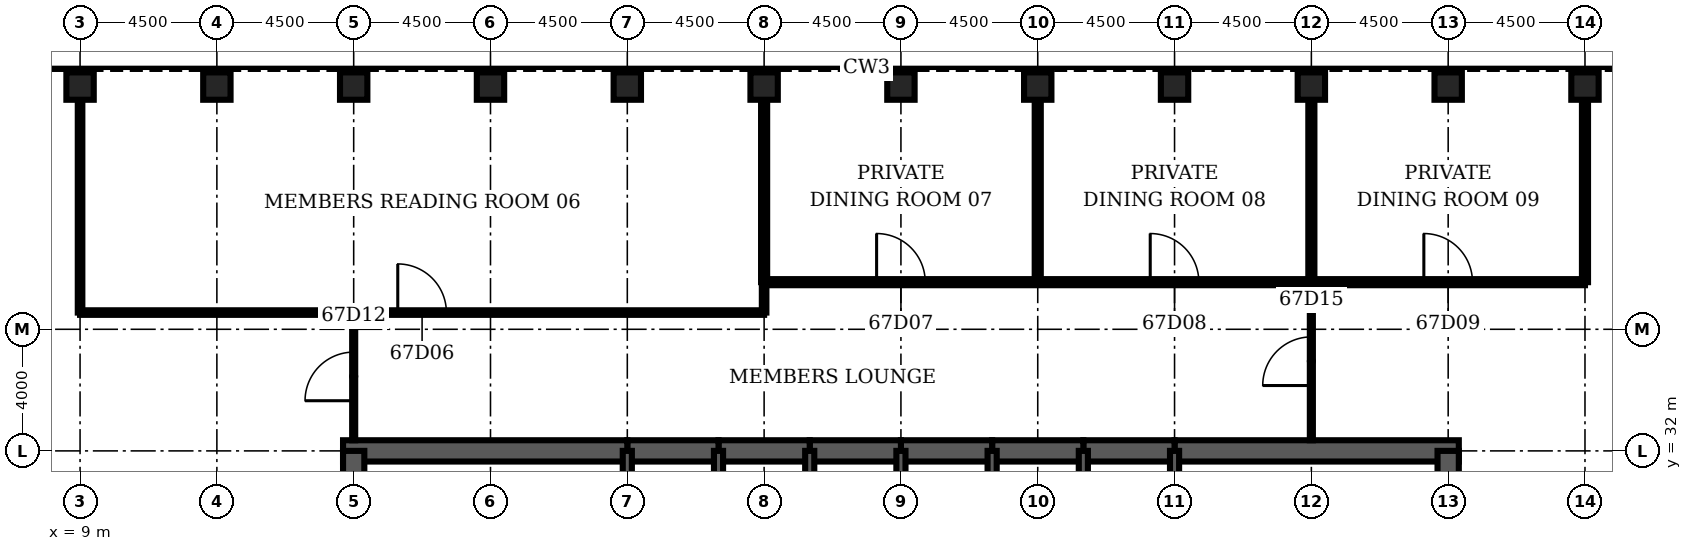
"""IFC4 building model, lengths in metres.
Left out: names, types, materials, properties, quantities, classifications, styles, units other than length and angle.
Written with IfcOpenShell. Run it as: python <this file> out.ifc"""

import sys

from ifc_helpers import new_model, si_unit, direction, frame, frame_2d, origin, origin_2d, place, context, subcontext, project, spatial, rectangle, hollow_rectangle, extrude, element, fill, save


model = new_model("IFC4")
c1 = context("Model", 3, precision=1e-05, world=origin(), true_north=direction((0.0, 1.0)))
c2 = subcontext(c1, "Body", "Model", "MODEL_VIEW")
j1 = project(units=[si_unit("LENGTHUNIT", "METRE"), si_unit("PLANEANGLEUNIT", "RADIAN")], contexts=[c1])
p1 = place(None, origin())
s1 = spatial("IfcSite", under=j1, at=p1, CompositionType="ELEMENT")
p2 = place(p1, origin())
s2 = spatial("IfcBuilding", under=s1, at=p2, CompositionType="ELEMENT")
p3 = place(p2, frame((0.0, 0.0, 296.3)))
s3 = spatial("IfcBuildingStorey", under=s2, at=p3, CompositionType="ELEMENT", Elevation=296.3)
for number, where, z_axis, x_axis in (
    (1, (58.5, 44.0, 0.0), (0.0, 0.0, 1.0), (0.0, 1.0, 0.0)),
    (2, (54.0, 44.0, 0.0), (0.0, 0.0, 1.0), (0.0, 1.0, 0.0)),
    (3, (49.5, 44.0, 0.0), (0.0, 0.0, 1.0), (0.0, 1.0, 0.0)),
    (4, (45.0, 44.0, 0.0), (0.0, 0.0, 1.0), (0.0, 1.0, 0.0)),
    (5, (40.5, 44.0, 0.0), (0.0, 0.0, 1.0), (0.0, 1.0, 0.0)),
    (6, (36.0, 44.0, 0.0), (0.0, 0.0, 1.0), (0.0, 1.0, 0.0)),
    (7, (31.5, 44.0, 0.0), (0.0, 0.0, 1.0), (0.0, 1.0, 0.0)),
    (8, (27.0, 44.0, 0.0), (0.0, 0.0, 1.0), (0.0, 1.0, 0.0)),
    (9, (22.5, 44.0, 0.0), (0.0, 0.0, 1.0), (0.0, 1.0, 0.0)),
    (10, (18.0, 44.0, 0.0), (0.0, 0.0, 1.0), (0.0, 1.0, 0.0)),
    (11, (13.5, 44.0, 0.0), (0.0, 0.0, 1.0), (0.0, 1.0, 0.0)),
    (12, (9.0, 44.0, 0.0), (0.0, 0.0, 1.0), (0.0, 1.0, 0.0)),
):
    element("IfcColumn", number, at=place(p3, frame(where, z_axis=z_axis, x_axis=x_axis)), inside=s3, PredefinedType="COLUMN", context=c2, shape_type="SweptSolid", body=[
        extrude(hollow_rectangle(XDim=0.9, YDim=0.9, WallThickness=0.06, at=origin_2d()), origin(), (0.0, 0.0, 1.0), 4.2),
    ])
p4 = place(p3, frame((54.35, 32.0, 0.0), z_axis=(0.0, 0.0, 1.0), x_axis=(-1.0, 0.0, 0.0)))
e13 = element("IfcWall", 13, at=p4, inside=s3, PredefinedType="SHEAR", context=c2, shape_type="SweptSolid", body=[
    extrude(rectangle(XDim=9.35, YDim=0.7, at=frame_2d((4.675, 0.0))), origin(), (0.0, 0.0, 1.0), 4.2),
])
for number, where, z_axis, x_axis in (
    (14, (45.0, 32.0, 0.0), (0.0, 0.0, 1.0), (-1.0, 0.0, 0.0)),
    (15, (42.0, 32.0, 0.0), (0.0, 0.0, 1.0), (-1.0, 0.0, 0.0)),
    (16, (39.0, 32.0, 0.0), (0.0, 0.0, 1.0), (-1.0, 0.0, 0.0)),
    (17, (36.0, 32.0, 0.0), (0.0, 0.0, 1.0), (-1.0, 0.0, 0.0)),
    (18, (33.0, 32.0, 0.0), (0.0, 0.0, 1.0), (-1.0, 0.0, 0.0)),
    (19, (30.0, 32.0, 0.0), (0.0, 0.0, 1.0), (-1.0, 0.0, 0.0)),
):
    element("IfcWall", number, at=place(p3, frame(where, z_axis=z_axis, x_axis=x_axis)), inside=s3, PredefinedType="SHEAR", context=c2, shape_type="SweptSolid", body=[
        extrude(rectangle(XDim=3.0, YDim=0.7, at=frame_2d((1.5, 0.0))), origin(), (0.0, 0.0, 1.0), 4.2),
    ])
p5 = place(p3, frame((27.0, 32.0, 0.0), z_axis=(0.0, 0.0, 1.0), x_axis=(-1.0, 0.0, 0.0)))
e20 = element("IfcWall", 20, at=p5, inside=s3, PredefinedType="SHEAR", context=c2, shape_type="SweptSolid", body=[
    extrude(rectangle(XDim=9.35, YDim=0.7, at=frame_2d((4.675, 0.0))), origin(), (0.0, 0.0, 1.0), 4.2),
])
for number, where, z_axis, x_axis in (
    (21, (18.0, 32.0, 0.0), (0.0, 0.0, 1.0), (0.0, -1.0, 0.0)),
    (22, (54.0, 28.8, 0.0), (0.0, 0.0, 1.0), (0.0, 1.0, 0.0)),
):
    element("IfcWall", number, at=place(p3, frame(where, z_axis=z_axis, x_axis=x_axis)), inside=s3, PredefinedType="SHEAR", context=c2, shape_type="SweptSolid", body=[
        extrude(rectangle(XDim=3.2, YDim=0.7, at=frame_2d((1.6, 0.0))), origin(), (0.0, 0.0, 1.0), 4.2),
    ])
for number, where, z_axis, x_axis in (
    (23, (27.0, 28.8, 0.0), (0.0, 0.0, 1.0), (0.0, 1.0, 0.0)),
    (24, (30.0, 28.8, 0.0), (0.0, 0.0, 1.0), (0.0, 1.0, 0.0)),
    (25, (33.0, 28.8, 0.0), (0.0, 0.0, 1.0), (0.0, 1.0, 0.0)),
    (26, (36.0, 28.8, 0.0), (0.0, 0.0, 1.0), (0.0, 1.0, 0.0)),
    (27, (39.0, 28.8, 0.0), (0.0, 0.0, 1.0), (0.0, 1.0, 0.0)),
    (28, (42.0, 28.8, 0.0), (0.0, 0.0, 1.0), (0.0, 1.0, 0.0)),
    (29, (45.0, 28.8, 0.0), (0.0, 0.0, 1.0), (0.0, 1.0, 0.0)),
):
    element("IfcWall", number, at=place(p3, frame(where, z_axis=z_axis, x_axis=x_axis)), inside=s3, PredefinedType="SOLIDWALL", context=c2, shape_type="SweptSolid", body=[
        extrude(rectangle(XDim=3.2, YDim=0.3, at=frame_2d((1.6, 0.0))), origin(), (0.0, 0.0, 1.0), 4.2),
    ])
p6 = place(p3, frame((9.0, 36.55, 0.0), z_axis=(0.0, 0.0, 1.0), x_axis=(1.0, 0.0, 0.0)))
e30 = element("IfcWall", 30, at=p6, inside=s3, PredefinedType="PARTITIONING", context=c2, shape_type="SweptSolid", body=[
    extrude(rectangle(XDim=22.5, YDim=0.15, at=frame_2d((11.25, 0.0))), origin(), (0.0, 0.0, 1.0), 3.0),
])
p7 = place(p6, frame((10.45, 0.0, 0.0)))
e31 = element("IfcOpeningElement", 31, at=p7, cuts=e30, PredefinedType="OPENING", context=c2, shape_type="SweptSolid", body=[
    extrude(rectangle(XDim=1.6, YDim=2.1, at=frame_2d((0.8, 1.05))), frame((0.0, 0.085, 0.0), z_axis=(0.0, -1.0, 0.0), x_axis=(1.0, 0.0, 0.0)), (0.0, 0.0, 1.0), 0.17),
])
p8 = place(p3, frame((31.5, 37.55, 0.0), z_axis=(0.0, 0.0, 1.0), x_axis=(1.0, 0.0, 0.0)))
e32 = element("IfcWall", 32, at=p8, inside=s3, PredefinedType="PARTITIONING", context=c2, shape_type="SweptSolid", body=[
    extrude(rectangle(XDim=27.0, YDim=0.2, at=frame_2d((13.5, 0.0))), origin(), (0.0, 0.0, 1.0), 3.0),
])
p9 = place(p8, frame((3.7, 0.0, 0.0)))
e33 = element("IfcOpeningElement", 33, at=p9, cuts=e32, PredefinedType="OPENING", context=c2, shape_type="SweptSolid", body=[
    extrude(rectangle(XDim=1.6, YDim=2.1, at=frame_2d((0.8, 1.05))), frame((0.0, 0.11, 0.0), z_axis=(0.0, -1.0, 0.0), x_axis=(1.0, 0.0, 0.0)), (0.0, 0.0, 1.0), 0.22),
])
p10 = place(p8, frame((12.7, 0.0, 0.0)))
e34 = element("IfcOpeningElement", 34, at=p10, cuts=e32, PredefinedType="OPENING", context=c2, shape_type="SweptSolid", body=[
    extrude(rectangle(XDim=1.6, YDim=2.1, at=frame_2d((0.8, 1.05))), frame((0.0, 0.11, 0.0), z_axis=(0.0, -1.0, 0.0), x_axis=(1.0, 0.0, 0.0)), (0.0, 0.0, 1.0), 0.22),
])
p11 = place(p8, frame((21.7, 0.0, 0.0)))
e35 = element("IfcOpeningElement", 35, at=p11, cuts=e32, PredefinedType="OPENING", context=c2, shape_type="SweptSolid", body=[
    extrude(rectangle(XDim=1.6, YDim=2.1, at=frame_2d((0.8, 1.05))), frame((0.0, 0.11, 0.0), z_axis=(0.0, -1.0, 0.0), x_axis=(1.0, 0.0, 0.0)), (0.0, 0.0, 1.0), 0.22),
])
p12 = place(p3, frame((9.0, 36.55, 0.0), z_axis=(0.0, 0.0, 1.0), x_axis=(0.0, 1.0, 0.0)))
e36 = element("IfcWall", 36, at=p12, inside=s3, PredefinedType="PARTITIONING", context=c2, shape_type="SweptSolid", body=[
    extrude(rectangle(XDim=7.0, YDim=0.15, at=frame_2d((3.5, 0.0))), origin(), (0.0, 0.0, 1.0), 3.0),
])
p13 = place(p3, frame((18.0, 32.35, 0.0), z_axis=(0.0, 0.0, 1.0), x_axis=(0.0, 1.0, 0.0)))
e37 = element("IfcWall", 37, at=p13, inside=s3, PredefinedType="PARTITIONING", context=c2, shape_type="SweptSolid", body=[
    extrude(rectangle(XDim=4.2, YDim=0.1, at=frame_2d((2.1, 0.0))), origin(), (0.0, 0.0, 1.0), 3.0),
])
p14 = place(p13, frame((1.3, 0.0, 0.0)))
e38 = element("IfcOpeningElement", 38, at=p14, cuts=e37, PredefinedType="OPENING", context=c2, shape_type="SweptSolid", body=[
    extrude(rectangle(XDim=1.6, YDim=2.1, at=frame_2d((0.8, 1.05))), frame((0.0, 0.06, 0.0), z_axis=(0.0, -1.0, 0.0), x_axis=(1.0, 0.0, 0.0)), (0.0, 0.0, 1.0), 0.12),
])
p15 = place(p3, frame((31.5, 36.55, 0.0), z_axis=(0.0, 0.0, 1.0), x_axis=(0.0, 1.0, 0.0)))
e39 = element("IfcWall", 39, at=p15, inside=s3, PredefinedType="PARTITIONING", context=c2, shape_type="SweptSolid", body=[
    extrude(rectangle(XDim=1.0, YDim=0.15, at=frame_2d((0.5, 0.0))), origin(), (0.0, 0.0, 1.0), 3.0),
])
for number, where, z_axis, x_axis in (
    (40, (31.5, 37.55, 0.0), (0.0, 0.0, 1.0), (0.0, 1.0, 0.0)),
    (41, (40.5, 37.55, 0.0), (0.0, 0.0, 1.0), (0.0, 1.0, 0.0)),
):
    element("IfcWall", number, at=place(p3, frame(where, z_axis=z_axis, x_axis=x_axis)), inside=s3, PredefinedType="PARTITIONING", context=c2, shape_type="SweptSolid", body=[
        extrude(rectangle(XDim=6.0, YDim=0.2, at=frame_2d((3.0, 0.0))), origin(), (0.0, 0.0, 1.0), 3.0),
    ])
p16 = place(p3, frame((49.5, 32.35, 0.0), z_axis=(0.0, 0.0, 1.0), x_axis=(0.0, 1.0, 0.0)))
e42 = element("IfcWall", 42, at=p16, inside=s3, PredefinedType="PARTITIONING", context=c2, shape_type="SweptSolid", body=[
    extrude(rectangle(XDim=5.2, YDim=0.1, at=frame_2d((2.6, 0.0))), origin(), (0.0, 0.0, 1.0), 3.0),
])
p17 = place(p16, frame((1.8, 0.0, 0.0)))
e43 = element("IfcOpeningElement", 43, at=p17, cuts=e42, PredefinedType="OPENING", context=c2, shape_type="SweptSolid", body=[
    extrude(rectangle(XDim=1.6, YDim=2.1, at=frame_2d((0.8, 1.05))), frame((0.0, 0.06, 0.0), z_axis=(0.0, -1.0, 0.0), x_axis=(1.0, 0.0, 0.0)), (0.0, 0.0, 1.0), 0.12),
])
for number, where, z_axis, x_axis in (
    (44, (49.5, 37.55, 0.0), (0.0, 0.0, 1.0), (0.0, 1.0, 0.0)),
    (45, (58.5, 37.55, 0.0), (0.0, 0.0, 1.0), (0.0, 1.0, 0.0)),
):
    element("IfcWall", number, at=place(p3, frame(where, z_axis=z_axis, x_axis=x_axis)), inside=s3, PredefinedType="PARTITIONING", context=c2, shape_type="SweptSolid", body=[
        extrude(rectangle(XDim=6.0, YDim=0.2, at=frame_2d((3.0, 0.0))), origin(), (0.0, 0.0, 1.0), 3.0),
    ])
p18 = place(p7, origin())
e46 = element("IfcDoor", 46, at=p18, inside=s3, OperationType="SINGLE_SWING_LEFT", PredefinedType="DOOR", context=c2, shape_type="SweptSolid", body=[
    extrude(rectangle(XDim=1.6, YDim=2.1, at=frame_2d((0.8, 1.05))), frame((0.0, 0.025, 0.0), z_axis=(0.0, -1.0, 0.0), x_axis=(1.0, 0.0, 0.0)), (0.0, 0.0, 1.0), 0.05),
])
fill(e31, e46)
p19 = place(p9, origin())
e47 = element("IfcDoor", 47, at=p19, inside=s3, OperationType="SINGLE_SWING_LEFT", PredefinedType="DOOR", context=c2, shape_type="SweptSolid", body=[
    extrude(rectangle(XDim=1.6, YDim=2.1, at=frame_2d((0.8, 1.05))), frame((0.0, 0.025, 0.0), z_axis=(0.0, -1.0, 0.0), x_axis=(1.0, 0.0, 0.0)), (0.0, 0.0, 1.0), 0.05),
])
fill(e33, e47)
p20 = place(p10, origin())
e48 = element("IfcDoor", 48, at=p20, inside=s3, OperationType="SINGLE_SWING_LEFT", PredefinedType="DOOR", context=c2, shape_type="SweptSolid", body=[
    extrude(rectangle(XDim=1.6, YDim=2.1, at=frame_2d((0.8, 1.05))), frame((0.0, 0.025, 0.0), z_axis=(0.0, -1.0, 0.0), x_axis=(1.0, 0.0, 0.0)), (0.0, 0.0, 1.0), 0.05),
])
fill(e34, e48)
p21 = place(p11, origin())
e49 = element("IfcDoor", 49, at=p21, inside=s3, OperationType="SINGLE_SWING_LEFT", PredefinedType="DOOR", context=c2, shape_type="SweptSolid", body=[
    extrude(rectangle(XDim=1.6, YDim=2.1, at=frame_2d((0.8, 1.05))), frame((0.0, 0.025, 0.0), z_axis=(0.0, -1.0, 0.0), x_axis=(1.0, 0.0, 0.0)), (0.0, 0.0, 1.0), 0.05),
])
fill(e35, e49)
p22 = place(p14, origin())
e50 = element("IfcDoor", 50, at=p22, inside=s3, OperationType="SINGLE_SWING_LEFT", PredefinedType="DOOR", context=c2, shape_type="SweptSolid", body=[
    extrude(rectangle(XDim=1.6, YDim=2.1, at=frame_2d((0.8, 1.05))), frame((0.0, 0.025, 0.0), z_axis=(0.0, -1.0, 0.0), x_axis=(1.0, 0.0, 0.0)), (0.0, 0.0, 1.0), 0.05),
])
fill(e38, e50)
p23 = place(p17, origin())
e51 = element("IfcDoor", 51, at=p23, inside=s3, OperationType="SINGLE_SWING_LEFT", PredefinedType="DOOR", context=c2, shape_type="SweptSolid", body=[
    extrude(rectangle(XDim=1.6, YDim=2.1, at=frame_2d((0.8, 1.05))), frame((0.0, 0.025, 0.0), z_axis=(0.0, -1.0, 0.0), x_axis=(1.0, 0.0, 0.0)), (0.0, 0.0, 1.0), 0.05),
])
fill(e43, e51)
save(model, sys.argv[1])
